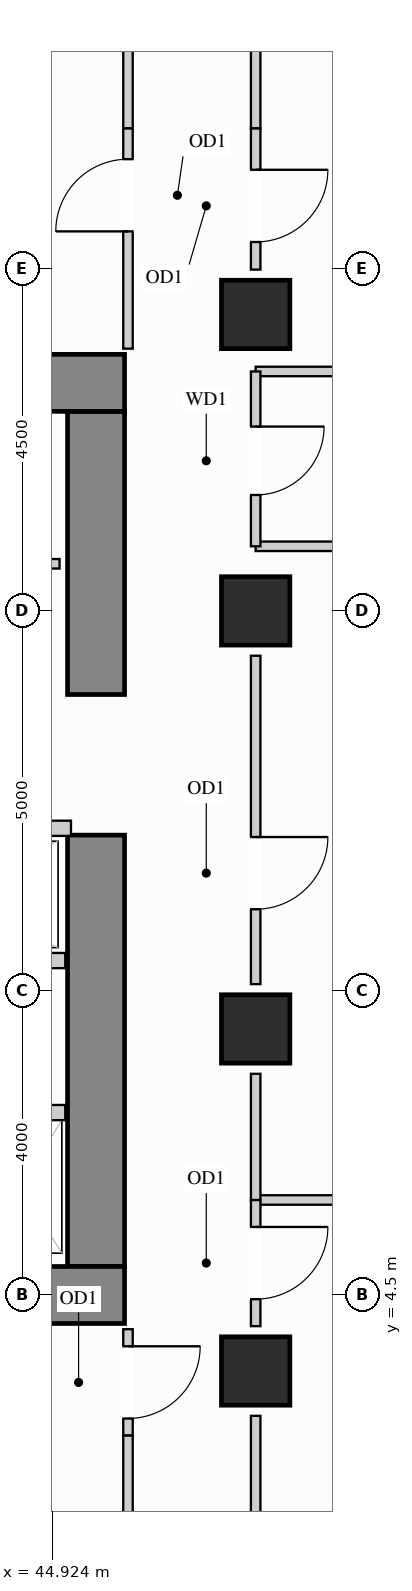
"""IFC4 building model, lengths in metres.
Left out: names, types, materials, properties, quantities, classifications, styles, units other than length and angle.
Written with IfcOpenShell. Run it as: python <this file> out.ifc"""

import sys

from ifc_helpers import new_model, si_unit, direction, frame, frame_2d, origin, origin_2d, place, context, subcontext, project, spatial, rectangle, extrude, source, transform, mapped, element, fill, save


model = new_model("IFC4")
c1 = context("Model", 3, precision=1e-05, world=origin(), true_north=direction((0.0, 1.0)))
c2 = subcontext(c1, "Body", "Model", "MODEL_VIEW")
j1 = project(units=[si_unit("LENGTHUNIT", "METRE"), si_unit("PLANEANGLEUNIT", "RADIAN")], contexts=[c1])
p1 = place(None, origin())
s1 = spatial("IfcSite", under=j1, at=p1, CompositionType="ELEMENT")
p2 = place(p1, origin())
s2 = spatial("IfcBuilding", under=s1, at=p2, CompositionType="ELEMENT")
p3 = place(p2, frame((0.0, 0.0, 91.8)))
s3 = spatial("IfcBuildingStorey", under=s2, at=p3, CompositionType="ELEMENT", Elevation=91.8)
m1 = source(origin(), c2, "Body", "SweptSolid", [
    extrude(rectangle(XDim=0.9, YDim=0.9, at=origin_2d()), origin(), (0.0, 0.0, 1.0), 3.38),
])
for number, where, z_axis, x_axis in (
    (1, (47.6, 13.5, 0.0), (0.0, 0.0, 1.0), (1.0, 0.0, 0.0)),
    (2, (47.6, 3.5, 0.0), (0.0, 0.0, 1.0), (1.0, 0.0, 0.0)),
    (3, (47.6, 8.0, 0.0), (0.0, 0.0, 1.0), (1.0, 0.0, 0.0)),
    (4, (47.6, 17.4, 0.0), (0.0, 0.0, 1.0), (1.0, 0.0, 0.0)),
):
    element("IfcColumn", number, at=place(p3, frame(where, z_axis=z_axis, x_axis=x_axis)), inside=s3, PredefinedType="COLUMN", context=c2, shape_type="MappedRepresentation", body=[
        mapped(m1, transform((0.0, 0.0, 0.0), x_axis=(1.0, 0.0, 0.0), y_axis=(0.0, 1.0, 0.0), z_axis=(0.0, 0.0, 1.0))),
    ])
m2 = source(origin(), c2, "Body", "SweptSolid", [
    extrude(rectangle(XDim=5.675, YDim=0.75, at=frame_2d((2.837, 0.0))), origin(), (0.0, 0.0, 1.0), 3.38),
])
p4 = place(p3, frame((45.5, 4.875, 0.0), z_axis=(0.0, 0.0, 1.0), x_axis=(0.0, 1.0, 0.0)))
e5 = element("IfcWall", 5, at=p4, inside=s3, PredefinedType="SHEAR", context=c2, shape_type="MappedRepresentation", body=[
    mapped(m2, transform((0.0, 0.0, 0.0), x_axis=(1.0, 0.0, 0.0), y_axis=(0.0, 1.0, 0.0), z_axis=(0.0, 0.0, 1.0))),
])
m3 = source(origin(), c2, "Body", "SweptSolid", [
    extrude(rectangle(XDim=3.725, YDim=0.75, at=frame_2d((1.863, 0.0))), origin(), (0.0, 0.0, 1.0), 3.38),
])
p5 = place(p3, frame((45.5, 12.4, 0.0), z_axis=(0.0, 0.0, 1.0), x_axis=(0.0, 1.0, 0.0)))
e6 = element("IfcWall", 6, at=p5, inside=s3, PredefinedType="SHEAR", context=c2, shape_type="MappedRepresentation", body=[
    mapped(m3, transform((0.0, 0.0, 0.0), x_axis=(1.0, 0.0, 0.0), y_axis=(0.0, 1.0, 0.0), z_axis=(0.0, 0.0, 1.0))),
])
m4 = source(origin(), c2, "Body", "SweptSolid", [
    extrude(rectangle(XDim=10.25, YDim=0.75, at=frame_2d((5.125, 0.0))), origin(), (0.0, 0.0, 1.0), 3.38),
])
for number, where, z_axis, x_axis in (
    (7, (35.625, 16.5, 0.0), (0.0, 0.0, 1.0), (1.0, 0.0, 0.0)),
    (8, (35.625, 4.5, 0.0), (0.0, 0.0, 1.0), (1.0, 0.0, 0.0)),
):
    element("IfcWall", number, at=place(p3, frame(where, z_axis=z_axis, x_axis=x_axis)), inside=s3, PredefinedType="SHEAR", context=c2, shape_type="MappedRepresentation", body=[
        mapped(m4, transform((0.0, 0.0, 0.0), x_axis=(1.0, 0.0, 0.0), y_axis=(0.0, 1.0, 0.0), z_axis=(0.0, 0.0, 1.0))),
    ])
p6 = place(p3, frame((36.5, 14.12, 0.0), z_axis=(0.0, 0.0, 1.0), x_axis=(1.0, 0.0, 0.0)))
e9 = element("IfcWall", 9, at=p6, inside=s3, PredefinedType="PARTITIONING", context=c2, shape_type="SweptSolid", body=[
    extrude(rectangle(XDim=8.52, YDim=0.125, at=frame_2d((4.26, 0.0))), origin(), (0.0, 0.0, 1.0), 3.365),
])
p7 = place(p6, frame((3.785, 0.0, 0.0)))
e10 = element("IfcOpeningElement", 10, at=p7, cuts=e9, PredefinedType="OPENING", context=c2, shape_type="SweptSolid", body=[
    extrude(rectangle(XDim=0.95, YDim=2.15, at=frame_2d((0.475, 1.075))), frame((0.0, 0.073, 0.0), z_axis=(0.0, -1.0, 0.0), x_axis=(1.0, 0.0, 0.0)), (0.0, 0.0, 1.0), 0.145),
])
m5 = source(origin(), c2, "Body", "SweptSolid", [
    extrude(rectangle(XDim=8.048, YDim=0.125, at=frame_2d((4.024, 0.0))), origin(), (0.0, 0.0, 1.0), 3.365),
])
p8 = place(p3, frame((47.6, 14.35, 0.0), z_axis=(0.0, 0.0, 1.0), x_axis=(1.0, 0.0, 0.0)))
e11 = element("IfcWall", 11, at=p8, inside=s3, PredefinedType="PARTITIONING", context=c2, shape_type="MappedRepresentation", body=[
    mapped(m5, transform((0.0, 0.0, 0.0), x_axis=(1.0, 0.0, 0.0), y_axis=(0.0, 1.0, 0.0), z_axis=(0.0, 0.0, 1.0))),
])
m6 = source(origin(), c2, "Body", "SweptSolid", [
    extrude(rectangle(XDim=8.048, YDim=0.125, at=frame_2d((4.024, 0.0))), origin(), (0.0, 0.0, 1.0), 2.677),
])
p9 = place(p3, frame((47.6, 16.65, 0.0), z_axis=(0.0, 0.0, 1.0), x_axis=(1.0, 0.0, 0.0)))
e12 = element("IfcWall", 12, at=p9, inside=s3, PredefinedType="PARTITIONING", context=c2, shape_type="MappedRepresentation", body=[
    mapped(m6, transform((0.0, 0.0, 0.0), x_axis=(1.0, 0.0, 0.0), y_axis=(0.0, 1.0, 0.0), z_axis=(0.0, 0.0, 1.0))),
])
p10 = place(p3, frame((47.6, 5.75, 0.0), z_axis=(0.0, 0.0, 1.0), x_axis=(1.0, 0.0, 0.0)))
e13 = element("IfcWall", 13, at=p10, inside=s3, PredefinedType="PARTITIONING", context=c2, shape_type="MappedRepresentation", body=[
    mapped(m5, transform((0.0, 0.0, 0.0), x_axis=(1.0, 0.0, 0.0), y_axis=(0.0, 1.0, 0.0), z_axis=(0.0, 0.0, 1.0))),
])
p11 = place(p3, frame((47.6, 4.09, 0.0), z_axis=(0.0, 0.0, 1.0), x_axis=(0.0, 1.0, 0.0)))
e14 = element("IfcWall", 14, at=p11, inside=s3, PredefinedType="PARTITIONING", context=c2, shape_type="SweptSolid", body=[
    extrude(rectangle(XDim=1.66, YDim=0.125, at=frame_2d((0.83, 0.0))), origin(), (0.0, 0.0, 1.0), 2.677),
])
p12 = place(p11, frame((0.355, 0.0, 0.0)))
e15 = element("IfcOpeningElement", 15, at=p12, cuts=e14, PredefinedType="OPENING", context=c2, shape_type="SweptSolid", body=[
    extrude(rectangle(XDim=0.95, YDim=2.15, at=frame_2d((0.475, 1.075))), frame((0.0, 0.073, 0.0), z_axis=(0.0, -1.0, 0.0), x_axis=(1.0, 0.0, 0.0)), (0.0, 0.0, 1.0), 0.145),
])
m7 = source(origin(), c2, "Body", "SweptSolid", [
    extrude(rectangle(XDim=1.72, YDim=0.125, at=frame_2d((0.86, 0.0))), origin(), (0.0, 0.0, 1.0), 2.677),
])
p13 = place(p3, frame((47.6, 1.19, 0.0), z_axis=(0.0, 0.0, 1.0), x_axis=(0.0, 1.0, 0.0)))
e16 = element("IfcWall", 16, at=p13, inside=s3, PredefinedType="PARTITIONING", context=c2, shape_type="MappedRepresentation", body=[
    mapped(m7, transform((0.0, 0.0, 0.0), x_axis=(1.0, 0.0, 0.0), y_axis=(0.0, 1.0, 0.0), z_axis=(0.0, 0.0, 1.0))),
])
m8 = source(origin(), c2, "Body", "SweptSolid", [
    extrude(rectangle(XDim=1.66, YDim=0.125, at=frame_2d((0.83, 0.0))), origin(), (0.0, 0.0, 1.0), 2.677),
])
p14 = place(p3, frame((47.6, 5.75, 0.0), z_axis=(0.0, 0.0, 1.0), x_axis=(0.0, 1.0, 0.0)))
e17 = element("IfcWall", 17, at=p14, inside=s3, PredefinedType="PARTITIONING", context=c2, shape_type="MappedRepresentation", body=[
    mapped(m8, transform((0.0, 0.0, 0.0), x_axis=(1.0, 0.0, 0.0), y_axis=(0.0, 1.0, 0.0), z_axis=(0.0, 0.0, 1.0))),
])
p15 = place(p3, frame((47.6, 8.59, 0.0), z_axis=(0.0, 0.0, 1.0), x_axis=(0.0, 1.0, 0.0)))
e18 = element("IfcWall", 18, at=p15, inside=s3, PredefinedType="PARTITIONING", context=c2, shape_type="SweptSolid", body=[
    extrude(rectangle(XDim=4.32, YDim=0.125, at=frame_2d((2.16, 0.0))), origin(), (0.0, 0.0, 1.0), 2.677),
])
p16 = place(p15, frame((0.985, 0.0, 0.0)))
e19 = element("IfcOpeningElement", 19, at=p16, cuts=e18, PredefinedType="OPENING", context=c2, shape_type="SweptSolid", body=[
    extrude(rectangle(XDim=0.95, YDim=2.15, at=frame_2d((0.475, 1.075))), frame((0.0, 0.073, 0.0), z_axis=(0.0, -1.0, 0.0), x_axis=(1.0, 0.0, 0.0)), (0.0, 0.0, 1.0), 0.145),
])
p17 = place(p3, frame((47.6, 17.99, 0.0), z_axis=(0.0, 0.0, 1.0), x_axis=(0.0, 1.0, 0.0)))
e20 = element("IfcWall", 20, at=p17, inside=s3, PredefinedType="PARTITIONING", context=c2, shape_type="SweptSolid", body=[
    extrude(rectangle(XDim=1.86, YDim=0.125, at=frame_2d((0.93, 0.0))), origin(), (0.0, 0.0, 1.0), 2.677),
])
p18 = place(p17, frame((0.363, 0.0, 0.0)))
e21 = element("IfcOpeningElement", 21, at=p18, cuts=e20, PredefinedType="OPENING", context=c2, shape_type="SweptSolid", body=[
    extrude(rectangle(XDim=0.95, YDim=2.15, at=frame_2d((0.475, 1.075))), frame((0.0, 0.073, 0.0), z_axis=(0.0, -1.0, 0.0), x_axis=(1.0, 0.0, 0.0)), (0.0, 0.0, 1.0), 0.145),
])
m9 = source(origin(), c2, "Body", "SweptSolid", [
    extrude(rectangle(XDim=1.46, YDim=0.125, at=frame_2d((0.73, 0.0))), origin(), (0.0, 0.0, 1.0), 2.677),
])
p19 = place(p3, frame((47.6, 19.85, 0.0), z_axis=(0.0, 0.0, 1.0), x_axis=(0.0, 1.0, 0.0)))
e22 = element("IfcWall", 22, at=p19, inside=s3, PredefinedType="PARTITIONING", context=c2, shape_type="MappedRepresentation", body=[
    mapped(m9, transform((0.0, 0.0, 0.0), x_axis=(1.0, 0.0, 0.0), y_axis=(0.0, 1.0, 0.0), z_axis=(0.0, 0.0, 1.0))),
])
p20 = place(p3, frame((47.6, 14.35, 0.0), z_axis=(0.0, 0.0, 1.0), x_axis=(0.0, 1.0, 0.0)))
e23 = element("IfcWall", 23, at=p20, inside=s3, PredefinedType="PARTITIONING", context=c2, shape_type="SweptSolid", body=[
    extrude(rectangle(XDim=2.3, YDim=0.125, at=frame_2d((1.15, 0.0))), origin(), (0.0, 0.0, 1.0), 2.677),
])
p21 = place(p20, frame((0.675, 0.0, 0.0)))
e24 = element("IfcOpeningElement", 24, at=p21, cuts=e23, PredefinedType="OPENING", context=c2, shape_type="SweptSolid", body=[
    extrude(rectangle(XDim=0.9, YDim=2.15, at=frame_2d((0.45, 1.075))), frame((0.0, 0.073, 0.0), z_axis=(0.0, -1.0, 0.0), x_axis=(1.0, 0.0, 0.0)), (0.0, 0.0, 1.0), 0.145),
])
p22 = place(p3, frame((45.92, 16.95, 0.0), z_axis=(0.0, 0.0, 1.0), x_axis=(0.0, 1.0, 0.0)))
e25 = element("IfcWall", 25, at=p22, inside=s3, PredefinedType="PARTITIONING", context=c2, shape_type="SweptSolid", body=[
    extrude(rectangle(XDim=2.9, YDim=0.125, at=frame_2d((1.45, 0.0))), origin(), (0.0, 0.0, 1.0), 3.365),
])
p23 = place(p22, frame((1.543, 0.0, 0.0)))
e26 = element("IfcOpeningElement", 26, at=p23, cuts=e25, PredefinedType="OPENING", context=c2, shape_type="SweptSolid", body=[
    extrude(rectangle(XDim=0.95, YDim=2.15, at=frame_2d((0.475, 1.075))), frame((0.0, 0.073, 0.0), z_axis=(0.0, -1.0, 0.0), x_axis=(1.0, 0.0, 0.0)), (0.0, 0.0, 1.0), 0.145),
])
m10 = source(origin(), c2, "Body", "SweptSolid", [
    extrude(rectangle(XDim=2.298, YDim=0.125, at=frame_2d((1.149, 0.0))), origin(), (0.0, 0.0, 1.0), 3.365),
])
p24 = place(p3, frame((45.92, 19.85, 0.0), z_axis=(0.0, 0.0, 1.0), x_axis=(0.0, 1.0, 0.0)))
e27 = element("IfcWall", 27, at=p24, inside=s3, PredefinedType="PARTITIONING", context=c2, shape_type="MappedRepresentation", body=[
    mapped(m10, transform((0.0, 0.0, 0.0), x_axis=(1.0, 0.0, 0.0), y_axis=(0.0, 1.0, 0.0), z_axis=(0.0, 0.0, 1.0))),
])
p25 = place(p3, frame((45.92, 2.65, 0.0), z_axis=(0.0, 0.0, 1.0), x_axis=(0.0, 1.0, 0.0)))
e28 = element("IfcWall", 28, at=p25, inside=s3, PredefinedType="PARTITIONING", context=c2, shape_type="SweptSolid", body=[
    extrude(rectangle(XDim=1.4, YDim=0.125, at=frame_2d((0.7, 0.0))), origin(), (0.0, 0.0, 1.0), 3.365),
])
p26 = place(p25, frame((0.225, 0.0, 0.0)))
e29 = element("IfcOpeningElement", 29, at=p26, cuts=e28, PredefinedType="OPENING", context=c2, shape_type="SweptSolid", body=[
    extrude(rectangle(XDim=0.95, YDim=2.15, at=frame_2d((0.475, 1.075))), frame((0.0, 0.073, 0.0), z_axis=(0.0, -1.0, 0.0), x_axis=(1.0, 0.0, 0.0)), (0.0, 0.0, 1.0), 0.145),
])
p27 = place(p3, frame((45.92, 0.352, 0.0), z_axis=(0.0, 0.0, 1.0), x_axis=(0.0, 1.0, 0.0)))
e30 = element("IfcWall", 30, at=p27, inside=s3, PredefinedType="PARTITIONING", context=c2, shape_type="MappedRepresentation", body=[
    mapped(m10, transform((0.0, 0.0, 0.0), x_axis=(1.0, 0.0, 0.0), y_axis=(0.0, 1.0, 0.0), z_axis=(0.0, 0.0, 1.0))),
])
m11 = source(origin(), c2, "Body", "SweptSolid", [
    extrude(rectangle(XDim=1.245, YDim=0.2, at=frame_2d((0.623, 0.0))), origin(), (0.0, 0.0, 1.0), 3.365),
])
p28 = place(p3, frame((43.85, 6.9, 0.0), z_axis=(0.0, 0.0, 1.0), x_axis=(1.0, 0.0, 0.0)))
e31 = element("IfcWall", 31, at=p28, inside=s3, PredefinedType="PARTITIONING", context=c2, shape_type="MappedRepresentation", body=[
    mapped(m11, transform((0.0, 0.0, 0.0), x_axis=(1.0, 0.0, 0.0), y_axis=(0.0, 1.0, 0.0), z_axis=(0.0, 0.0, 1.0))),
])
m12 = source(origin(), c2, "Body", "SweptSolid", [
    extrude(rectangle(XDim=3.49, YDim=0.2, at=frame_2d((1.745, 0.0))), origin(), (0.0, 0.0, 1.0), 3.365),
])
p29 = place(p3, frame((41.68, 10.64, 0.0), z_axis=(0.0, 0.0, 1.0), x_axis=(1.0, 0.0, 0.0)))
e32 = element("IfcWall", 32, at=p29, inside=s3, PredefinedType="PARTITIONING", context=c2, shape_type="MappedRepresentation", body=[
    mapped(m12, transform((0.0, 0.0, 0.0), x_axis=(1.0, 0.0, 0.0), y_axis=(0.0, 1.0, 0.0), z_axis=(0.0, 0.0, 1.0))),
])
m13 = source(origin(), c2, "Body", "SweptSolid", [
    extrude(rectangle(XDim=3.415, YDim=0.2, at=frame_2d((1.708, 0.0))), origin(), (0.0, 0.0, 1.0), 3.365),
])
p30 = place(p3, frame((41.68, 8.9, 0.0), z_axis=(0.0, 0.0, 1.0), x_axis=(1.0, 0.0, 0.0)))
e33 = element("IfcWall", 33, at=p30, inside=s3, PredefinedType="PARTITIONING", context=c2, shape_type="MappedRepresentation", body=[
    mapped(m13, transform((0.0, 0.0, 0.0), x_axis=(1.0, 0.0, 0.0), y_axis=(0.0, 1.0, 0.0), z_axis=(0.0, 0.0, 1.0))),
])
m14 = source(origin(), c2, "Body", "SweptSolid", [
    extrude(rectangle(XDim=0.95, YDim=2.15, at=frame_2d((0.475, 1.075))), frame((0.0, 0.025, 0.0), z_axis=(0.0, -1.0, 0.0), x_axis=(1.0, 0.0, 0.0)), (0.0, 0.0, 1.0), 0.05),
])
p31 = place(p23, origin())
e34 = element("IfcDoor", 34, at=p31, inside=s3, OperationType="SINGLE_SWING_LEFT", PredefinedType="DOOR", context=c2, shape_type="MappedRepresentation", body=[
    mapped(m14, transform((0.0, 0.0, 0.0), x_axis=(1.0, 0.0, 0.0), y_axis=(0.0, 1.0, 0.0), z_axis=(0.0, 0.0, 1.0))),
])
fill(e26, e34)
p32 = place(p26, origin())
e35 = element("IfcDoor", 35, at=p32, inside=s3, OperationType="SINGLE_SWING_RIGHT", PredefinedType="DOOR", context=c2, shape_type="MappedRepresentation", body=[
    mapped(m14, transform((0.0, 0.0, 0.0), x_axis=(1.0, 0.0, 0.0), y_axis=(0.0, 1.0, 0.0), z_axis=(0.0, 0.0, 1.0))),
])
fill(e29, e35)
p33 = place(p12, origin())
e36 = element("IfcDoor", 36, at=p33, inside=s3, OperationType="SINGLE_SWING_RIGHT", PredefinedType="DOOR", context=c2, shape_type="MappedRepresentation", body=[
    mapped(m14, transform((0.0, 0.0, 0.0), x_axis=(1.0, 0.0, 0.0), y_axis=(0.0, 1.0, 0.0), z_axis=(0.0, 0.0, 1.0))),
])
fill(e15, e36)
p34 = place(p16, origin())
e37 = element("IfcDoor", 37, at=p34, inside=s3, OperationType="SINGLE_SWING_RIGHT", PredefinedType="DOOR", context=c2, shape_type="MappedRepresentation", body=[
    mapped(m14, transform((0.0, 0.0, 0.0), x_axis=(1.0, 0.0, 0.0), y_axis=(0.0, 1.0, 0.0), z_axis=(0.0, 0.0, 1.0))),
])
fill(e19, e37)
p35 = place(p18, origin())
e38 = element("IfcDoor", 38, at=p35, inside=s3, OperationType="SINGLE_SWING_RIGHT", PredefinedType="DOOR", context=c2, shape_type="MappedRepresentation", body=[
    mapped(m14, transform((0.0, 0.0, 0.0), x_axis=(1.0, 0.0, 0.0), y_axis=(0.0, 1.0, 0.0), z_axis=(0.0, 0.0, 1.0))),
])
fill(e21, e38)
m15 = source(origin(), c2, "Body", "SweptSolid", [
    extrude(rectangle(XDim=0.9, YDim=2.15, at=frame_2d((0.45, 1.075))), frame((0.0, 0.025, 0.0), z_axis=(0.0, -1.0, 0.0), x_axis=(1.0, 0.0, 0.0)), (0.0, 0.0, 1.0), 0.05),
])
p36 = place(p21, origin())
e39 = element("IfcDoor", 39, at=p36, inside=s3, OperationType="SINGLE_SWING_RIGHT", PredefinedType="DOOR", context=c2, shape_type="MappedRepresentation", body=[
    mapped(m15, transform((0.0, 0.0, 0.0), x_axis=(1.0, 0.0, 0.0), y_axis=(0.0, 1.0, 0.0), z_axis=(0.0, 0.0, 1.0))),
])
fill(e24, e39)
save(model, sys.argv[1])
